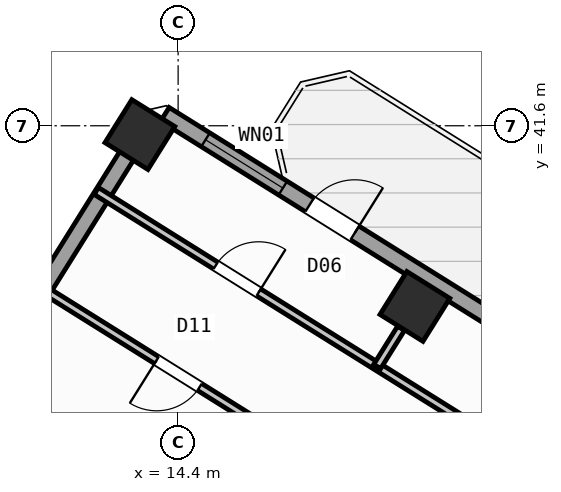
"""IFC4 building model, lengths in metres.
Left out: names, types, materials, properties, quantities, classifications, styles, units other than length and angle.
Written with IfcOpenShell. Run it as: python <this file> out.ifc"""

import sys

from ifc_helpers import new_model, si_unit, direction, frame, frame_2d, origin, origin_2d, place, context, subcontext, project, spatial, rectangle, hollow_rectangle, extrude, source, transform, mapped, element, fill, save


model = new_model("IFC4")
c1 = context("Model", 3, precision=1e-05, world=origin(), true_north=direction((0.0, 1.0)))
c2 = subcontext(c1, "Body", "Model", "MODEL_VIEW")
j1 = project(units=[si_unit("LENGTHUNIT", "METRE"), si_unit("PLANEANGLEUNIT", "RADIAN")], contexts=[c1])
p1 = place(None, origin())
s1 = spatial("IfcSite", under=j1, at=p1, CompositionType="ELEMENT")
p2 = place(p1, origin())
s2 = spatial("IfcBuilding", under=s1, at=p2, CompositionType="ELEMENT")
p3 = place(p2, frame((0.0, 0.0, 34.8)))
s3 = spatial("IfcBuildingStorey", under=s2, at=p3, CompositionType="ELEMENT", Elevation=34.8)
m1 = source(origin(), c2, "Body", "SweptSolid", [
    extrude(hollow_rectangle(XDim=1.0, YDim=1.0, WallThickness=0.04, at=origin_2d()), origin(), (0.0, 0.0, 1.0), 3.6),
])
for number, where, z_axis, x_axis in (
    (1, (19.073, 38.034, 0.0), (0.0, 0.0, 1.0), (-0.848, 0.53, 0.0)),
    (2, (13.646, 41.426, 0.0), (0.0, 0.0, 1.0), (-0.848, 0.53, 0.0)),
):
    element("IfcColumn", number, at=place(p3, frame(where, z_axis=z_axis, x_axis=x_axis)), inside=s3, PredefinedType="COLUMN", context=c2, shape_type="MappedRepresentation", body=[
        mapped(m1, transform((0.0, 0.0, 0.0), scale=1.0)),
    ])
p4 = place(p3, frame((2.415, 23.452, 0.0), z_axis=(0.0, 0.0, 1.0), x_axis=(0.52991049553, 0.848053575387, 0.0)))
e3 = element("IfcWall", 3, at=p4, inside=s3, PredefinedType="STANDARD", context=c2, shape_type="SweptSolid", body=[
    extrude(rectangle(XDim=21.587, YDim=0.32, at=frame_2d((10.794, 0.0))), origin(), (0.0, 0.0, 1.0), 2.725),
])
p5 = place(p4, frame((2.356, 0.0, 0.8)))
e4 = element("IfcOpeningElement", 4, at=p5, cuts=e3, PredefinedType="OPENING", context=c2, shape_type="SweptSolid", body=[
    extrude(rectangle(XDim=2.1, YDim=1.55, at=frame_2d((1.05, 0.775))), frame((0.0, 0.17, 0.0), z_axis=(0.0, -1.0, 0.0), x_axis=(1.0, 0.0, 0.0)), (0.0, 0.0, 1.0), 0.34),
])
p6 = place(p4, frame((9.344, 0.0, 0.85)))
e5 = element("IfcOpeningElement", 5, at=p6, cuts=e3, PredefinedType="OPENING", context=c2, shape_type="SweptSolid", body=[
    extrude(rectangle(XDim=1.8, YDim=1.5, at=frame_2d((0.9, 0.75))), frame((0.0, 0.17, 0.0), z_axis=(0.0, -1.0, 0.0), x_axis=(1.0, 0.0, 0.0)), (0.0, 0.0, 1.0), 0.34),
])
p7 = place(p4, frame((15.154, 0.0, 0.85)))
e6 = element("IfcOpeningElement", 6, at=p7, cuts=e3, PredefinedType="OPENING", context=c2, shape_type="SweptSolid", body=[
    extrude(rectangle(XDim=1.5, YDim=1.5, at=frame_2d((0.75, 0.75))), frame((0.0, 0.17, 0.0), z_axis=(0.0, -1.0, 0.0), x_axis=(1.0, 0.0, 0.0)), (0.0, 0.0, 1.0), 0.34),
])
p8 = place(p3, frame((14.138, 41.825, 0.0), z_axis=(0.0, 0.0, 1.0), x_axis=(0.848046498049, -0.529921821731, 0.0)))
e7 = element("IfcWall", 7, at=p8, inside=s3, PredefinedType="STANDARD", context=c2, shape_type="SweptSolid", body=[
    extrude(rectangle(XDim=31.588, YDim=0.32, at=frame_2d((15.794, 0.0))), origin(), (0.0, 0.0, 1.0), 3.35),
])
p9 = place(p8, frame((3.369, 0.0, 0.0)))
e8 = element("IfcOpeningElement", 8, at=p9, cuts=e7, PredefinedType="OPENING", context=c2, shape_type="SweptSolid", body=[
    extrude(rectangle(XDim=1.05, YDim=2.15, at=frame_2d((0.525, 1.075))), frame((0.0, 0.17, 0.0), z_axis=(0.0, -1.0, 0.0), x_axis=(1.0, 0.0, 0.0)), (0.0, 0.0, 1.0), 0.34),
])
p10 = place(p8, frame((0.946, 0.0, 0.85)))
e9 = element("IfcOpeningElement", 9, at=p10, cuts=e7, PredefinedType="OPENING", context=c2, shape_type="SweptSolid", body=[
    extrude(rectangle(XDim=1.8, YDim=1.5, at=frame_2d((0.9, 0.75))), frame((0.0, 0.17, 0.0), z_axis=(0.0, -1.0, 0.0), x_axis=(1.0, 0.0, 0.0)), (0.0, 0.0, 1.0), 0.34),
])
p11 = place(p8, frame((8.46, 0.0, 0.85)))
e10 = element("IfcOpeningElement", 10, at=p11, cuts=e7, PredefinedType="OPENING", context=c2, shape_type="SweptSolid", body=[
    extrude(rectangle(XDim=1.8, YDim=1.5, at=frame_2d((0.9, 0.75))), frame((0.0, 0.17, 0.0), z_axis=(0.0, -1.0, 0.0), x_axis=(1.0, 0.0, 0.0)), (0.0, 0.0, 1.0), 0.34),
])
p12 = place(p8, frame((13.899, 0.0, 0.85)))
e11 = element("IfcOpeningElement", 11, at=p12, cuts=e7, PredefinedType="OPENING", context=c2, shape_type="SweptSolid", body=[
    extrude(rectangle(XDim=1.5, YDim=1.5, at=frame_2d((0.75, 0.75))), frame((0.0, 0.17, 0.0), z_axis=(0.0, -1.0, 0.0), x_axis=(1.0, 0.0, 0.0)), (0.0, 0.0, 1.0), 0.34),
])
p13 = place(p8, frame((22.019, 0.0, 0.95)))
e12 = element("IfcOpeningElement", 12, at=p13, cuts=e7, PredefinedType="OPENING", context=c2, shape_type="SweptSolid", body=[
    extrude(rectangle(XDim=1.2, YDim=1.4, at=frame_2d((0.6, 0.7))), frame((0.0, 0.17, 0.0), z_axis=(0.0, -1.0, 0.0), x_axis=(1.0, 0.0, 0.0)), (0.0, 0.0, 1.0), 0.34),
])
p14 = place(p8, frame((27.569, 0.0, 0.95)))
e13 = element("IfcOpeningElement", 13, at=p14, cuts=e7, PredefinedType="OPENING", context=c2, shape_type="SweptSolid", body=[
    extrude(rectangle(XDim=1.2, YDim=1.4, at=frame_2d((0.6, 0.7))), frame((0.0, 0.17, 0.0), z_axis=(0.0, -1.0, 0.0), x_axis=(1.0, 0.0, 0.0)), (0.0, 0.0, 1.0), 0.34),
])
p15 = place(p3, frame((26.973, 31.447, 0.0), z_axis=(0.0, 0.0, 1.0), x_axis=(-0.848048310262, 0.529918921593, 0.0)))
e14 = element("IfcWall", 14, at=p15, inside=s3, PredefinedType="PARTITIONING", context=c2, shape_type="SweptSolid", body=[
    extrude(rectangle(XDim=16.73, YDim=0.16, at=frame_2d((8.365, 0.0))), origin(), (0.0, 0.0, 1.0), 3.34),
])
p16 = place(p15, frame((1.588, 0.0, 0.0)))
e15 = element("IfcOpeningElement", 15, at=p16, cuts=e14, PredefinedType="OPENING", context=c2, shape_type="SweptSolid", body=[
    extrude(rectangle(XDim=1.0, YDim=2.1, at=frame_2d((0.5, 1.05))), frame((0.0, 0.09, 0.0), z_axis=(0.0, -1.0, 0.0), x_axis=(1.0, 0.0, 0.0)), (0.0, 0.0, 1.0), 0.18),
])
p17 = place(p15, frame((6.685, 0.0, 0.0)))
e16 = element("IfcOpeningElement", 16, at=p17, cuts=e14, PredefinedType="OPENING", context=c2, shape_type="SweptSolid", body=[
    extrude(rectangle(XDim=1.0, YDim=2.1, at=frame_2d((0.5, 1.05))), frame((0.0, 0.09, 0.0), z_axis=(0.0, -1.0, 0.0), x_axis=(1.0, 0.0, 0.0)), (0.0, 0.0, 1.0), 0.18),
])
p18 = place(p15, frame((12.951, 0.0, 0.0)))
e17 = element("IfcOpeningElement", 17, at=p18, cuts=e14, PredefinedType="OPENING", context=c2, shape_type="SweptSolid", body=[
    extrude(rectangle(XDim=1.0, YDim=2.1, at=frame_2d((0.5, 1.05))), frame((0.0, 0.09, 0.0), z_axis=(0.0, -1.0, 0.0), x_axis=(1.0, 0.0, 0.0)), (0.0, 0.0, 1.0), 0.18),
])
p19 = place(p3, frame((25.807, 29.582, 0.0), z_axis=(0.0, 0.0, 1.0), x_axis=(-0.848052408131, 0.529912363569, 0.0)))
e18 = element("IfcWall", 18, at=p19, inside=s3, PredefinedType="PARTITIONING", context=c2, shape_type="SweptSolid", body=[
    extrude(rectangle(XDim=16.73, YDim=0.16, at=frame_2d((8.365, 0.0))), origin(), (0.0, 0.0, 1.0), 3.34),
])
p20 = place(p19, frame((2.22, 0.0, 0.0)))
e19 = element("IfcOpeningElement", 19, at=p20, cuts=e18, PredefinedType="OPENING", context=c2, shape_type="SweptSolid", body=[
    extrude(rectangle(XDim=0.86, YDim=2.05, at=frame_2d((0.43, 1.025))), frame((0.0, 0.09, 0.0), z_axis=(0.0, -1.0, 0.0), x_axis=(1.0, 0.0, 0.0)), (0.0, 0.0, 1.0), 0.18),
])
p21 = place(p19, frame((7.82, 0.0, 0.0)))
e20 = element("IfcOpeningElement", 20, at=p21, cuts=e18, PredefinedType="OPENING", context=c2, shape_type="SweptSolid", body=[
    extrude(rectangle(XDim=1.0, YDim=2.1, at=frame_2d((0.5, 1.05))), frame((0.0, 0.09, 0.0), z_axis=(0.0, -1.0, 0.0), x_axis=(1.0, 0.0, 0.0)), (0.0, 0.0, 1.0), 0.18),
])
p22 = place(p19, frame((12.95, 0.0, 0.0)))
e21 = element("IfcOpeningElement", 21, at=p22, cuts=e18, PredefinedType="OPENING", context=c2, shape_type="SweptSolid", body=[
    extrude(rectangle(XDim=1.0, YDim=2.1, at=frame_2d((0.5, 1.05))), frame((0.0, 0.09, 0.0), z_axis=(0.0, -1.0, 0.0), x_axis=(1.0, 0.0, 0.0)), (0.0, 0.0, 1.0), 0.18),
])
p23 = place(p3, frame((18.799, 37.602, 0.0), z_axis=(0.0, 0.0, 1.0), x_axis=(-0.529974231203, -0.848013746505, 0.0)))
e22 = element("IfcWall", 22, at=p23, inside=s3, PredefinedType="PARTITIONING", context=c2, shape_type="SweptSolid", body=[
    extrude(rectangle(XDim=0.888, YDim=0.16, at=frame_2d((0.444, 0.0))), origin(), (0.0, 0.0, 1.0), 2.725),
])
m2 = source(origin(), c2, "Body", "SweptSolid", [
    extrude(rectangle(XDim=1.05, YDim=2.15, at=frame_2d((0.525, 1.075))), frame((0.0, 0.025, 0.0), z_axis=(0.0, -1.0, 0.0), x_axis=(1.0, 0.0, 0.0)), (0.0, 0.0, 1.0), 0.05),
])
p24 = place(p9, origin())
e23 = element("IfcDoor", 23, at=p24, inside=s3, OperationType="SINGLE_SWING_RIGHT", PredefinedType="DOOR", context=c2, shape_type="MappedRepresentation", body=[
    mapped(m2, transform((0.0, 0.0, 0.0), scale=1.0)),
])
fill(e8, e23)
m3 = source(origin(), c2, "Body", "SweptSolid", [
    extrude(rectangle(XDim=1.8, YDim=1.5, at=frame_2d((0.9, 0.75))), frame((0.0, 0.03, 0.0), z_axis=(0.0, -1.0, 0.0), x_axis=(1.0, 0.0, 0.0)), (0.0, 0.0, 1.0), 0.06),
])
p25 = place(p10, origin())
e24 = element("IfcWindow", 24, at=p25, inside=s3, PartitioningType="SINGLE_PANEL", PredefinedType="WINDOW", context=c2, shape_type="MappedRepresentation", body=[
    mapped(m3, transform((0.0, 0.0, 0.0), scale=1.0)),
])
fill(e9, e24)
m4 = source(origin(), c2, "Body", "SweptSolid", [
    extrude(rectangle(XDim=1.0, YDim=2.1, at=frame_2d((0.5, 1.05))), frame((0.0, 0.025, 0.0), z_axis=(0.0, -1.0, 0.0), x_axis=(1.0, 0.0, 0.0)), (0.0, 0.0, 1.0), 0.05),
])
p26 = place(p22, origin())
e25 = element("IfcDoor", 25, at=p26, inside=s3, OperationType="SINGLE_SWING_RIGHT", PredefinedType="DOOR", context=c2, shape_type="MappedRepresentation", body=[
    mapped(m4, transform((0.0, 0.0, 0.0), scale=1.0)),
])
fill(e21, e25)
p27 = place(p18, frame((1.0, 0.0, 0.0), z_axis=(0.0, 0.0, 1.0), x_axis=(-1.0, 0.0, 0.0)))
e26 = element("IfcDoor", 26, at=p27, inside=s3, OperationType="SINGLE_SWING_RIGHT", PredefinedType="DOOR", context=c2, shape_type="MappedRepresentation", body=[
    mapped(m4, transform((0.0, 0.0, 0.0), scale=1.0)),
])
fill(e17, e26)
save(model, sys.argv[1])
